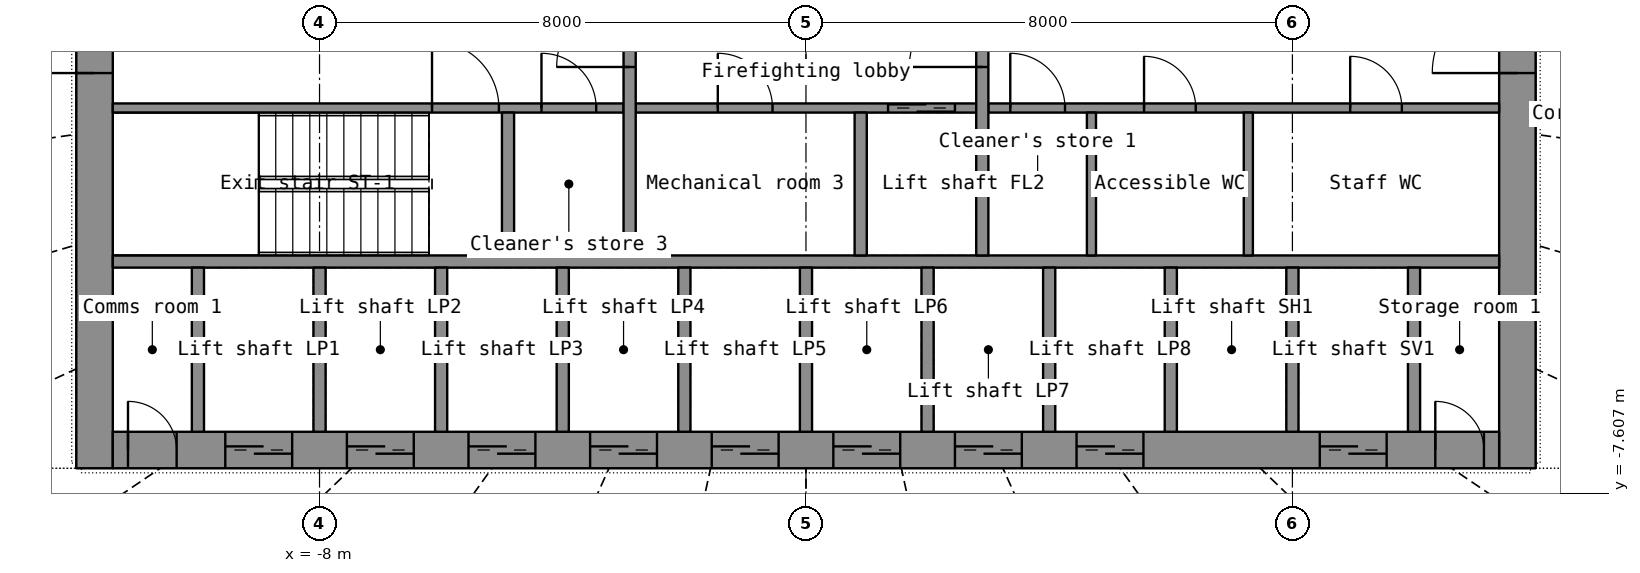
"""IFC4 building model, lengths in metres.
Left out: names, types, materials, properties, quantities, classifications, styles, units other than length and angle.
Written with IfcOpenShell. Run it as: python <this file> out.ifc"""

import sys

from ifc_helpers import new_model, si_unit, direction, frame, frame_2d, origin, place, context, subcontext, project, spatial, rectangle, extrude, element, fill, save


model = new_model("IFC4")
c1 = context("Model", 3, precision=1e-05, world=origin(), true_north=direction((0.0, 1.0)))
c2 = subcontext(c1, "Body", "Model", "MODEL_VIEW")
j1 = project(units=[si_unit("LENGTHUNIT", "METRE"), si_unit("PLANEANGLEUNIT", "RADIAN")], contexts=[c1])
p1 = place(None, origin())
s1 = spatial("IfcSite", under=j1, at=p1, CompositionType="ELEMENT")
p2 = place(p1, origin())
s2 = spatial("IfcBuilding", under=s1, at=p2, CompositionType="ELEMENT")
p3 = place(p2, frame((0.0, 0.0, 66.7)))
s3 = spatial("IfcBuildingStorey", under=s2, at=p3, CompositionType="ELEMENT", Elevation=66.7)
p4 = place(p3, frame((-11.7, -7.2, 0.0), z_axis=(0.0, 0.0, 1.0), x_axis=(0.0, 1.0, 0.0)))
e1 = element("IfcWall", 1, at=p4, inside=s3, PredefinedType="SHEAR", context=c2, shape_type="SweptSolid", body=[
    extrude(rectangle(XDim=14.4, YDim=0.6, at=frame_2d((7.2, 0.0))), origin(), (0.0, 0.0, 1.0), 3.3),
])
p5 = place(p4, frame((6.5, 0.0, 0.0)))
e2 = element("IfcOpeningElement", 2, at=p5, cuts=e1, PredefinedType="OPENING", context=c2, shape_type="SweptSolid", body=[
    extrude(rectangle(XDim=1.4, YDim=2.2, at=frame_2d((0.7, 1.1))), frame((0.0, 0.31, 0.0), z_axis=(0.0, -1.0, 0.0), x_axis=(1.0, 0.0, 0.0)), (0.0, 0.0, 1.0), 0.62),
])
p6 = place(p3, frame((11.7, -7.2, 0.0), z_axis=(0.0, 0.0, 1.0), x_axis=(0.0, 1.0, 0.0)))
e3 = element("IfcWall", 3, at=p6, inside=s3, PredefinedType="SHEAR", context=c2, shape_type="SweptSolid", body=[
    extrude(rectangle(XDim=14.4, YDim=0.6, at=frame_2d((7.2, 0.0))), origin(), (0.0, 0.0, 1.0), 3.3),
])
p7 = place(p6, frame((6.5, 0.0, 0.0)))
e4 = element("IfcOpeningElement", 4, at=p7, cuts=e3, PredefinedType="OPENING", context=c2, shape_type="SweptSolid", body=[
    extrude(rectangle(XDim=1.4, YDim=2.2, at=frame_2d((0.7, 1.1))), frame((0.0, 0.31, 0.0), z_axis=(0.0, -1.0, 0.0), x_axis=(1.0, 0.0, 0.0)), (0.0, 0.0, 1.0), 0.62),
])
p8 = place(p3, frame((-11.4, -6.9, 0.0), z_axis=(0.0, 0.0, 1.0), x_axis=(1.0, 0.0, 0.0)))
e5 = element("IfcWall", 5, at=p8, inside=s3, PredefinedType="SHEAR", context=c2, shape_type="SweptSolid", body=[
    extrude(rectangle(XDim=22.8, YDim=0.6, at=frame_2d((11.4, 0.0))), origin(), (0.0, 0.0, 1.0), 3.3),
])
p9 = place(p8, frame((1.85, 0.0, 0.0)))
e6 = element("IfcOpeningElement", 6, at=p9, cuts=e5, PredefinedType="OPENING", context=c2, shape_type="SweptSolid", body=[
    extrude(rectangle(XDim=1.1, YDim=2.2, at=frame_2d((0.55, 1.1))), frame((0.0, 0.31, 0.0), z_axis=(0.0, -1.0, 0.0), x_axis=(1.0, 0.0, 0.0)), (0.0, 0.0, 1.0), 0.62),
])
p10 = place(p8, frame((3.85, 0.0, 0.0)))
e7 = element("IfcOpeningElement", 7, at=p10, cuts=e5, PredefinedType="OPENING", context=c2, shape_type="SweptSolid", body=[
    extrude(rectangle(XDim=1.1, YDim=2.2, at=frame_2d((0.55, 1.1))), frame((0.0, 0.31, 0.0), z_axis=(0.0, -1.0, 0.0), x_axis=(1.0, 0.0, 0.0)), (0.0, 0.0, 1.0), 0.62),
])
p11 = place(p8, frame((5.85, 0.0, 0.0)))
e8 = element("IfcOpeningElement", 8, at=p11, cuts=e5, PredefinedType="OPENING", context=c2, shape_type="SweptSolid", body=[
    extrude(rectangle(XDim=1.1, YDim=2.2, at=frame_2d((0.55, 1.1))), frame((0.0, 0.31, 0.0), z_axis=(0.0, -1.0, 0.0), x_axis=(1.0, 0.0, 0.0)), (0.0, 0.0, 1.0), 0.62),
])
p12 = place(p8, frame((7.85, 0.0, 0.0)))
e9 = element("IfcOpeningElement", 9, at=p12, cuts=e5, PredefinedType="OPENING", context=c2, shape_type="SweptSolid", body=[
    extrude(rectangle(XDim=1.1, YDim=2.2, at=frame_2d((0.55, 1.1))), frame((0.0, 0.31, 0.0), z_axis=(0.0, -1.0, 0.0), x_axis=(1.0, 0.0, 0.0)), (0.0, 0.0, 1.0), 0.62),
])
p13 = place(p8, frame((9.85, 0.0, 0.0)))
e10 = element("IfcOpeningElement", 10, at=p13, cuts=e5, PredefinedType="OPENING", context=c2, shape_type="SweptSolid", body=[
    extrude(rectangle(XDim=1.1, YDim=2.2, at=frame_2d((0.55, 1.1))), frame((0.0, 0.31, 0.0), z_axis=(0.0, -1.0, 0.0), x_axis=(1.0, 0.0, 0.0)), (0.0, 0.0, 1.0), 0.62),
])
p14 = place(p8, frame((11.85, 0.0, 0.0)))
e11 = element("IfcOpeningElement", 11, at=p14, cuts=e5, PredefinedType="OPENING", context=c2, shape_type="SweptSolid", body=[
    extrude(rectangle(XDim=1.1, YDim=2.2, at=frame_2d((0.55, 1.1))), frame((0.0, 0.31, 0.0), z_axis=(0.0, -1.0, 0.0), x_axis=(1.0, 0.0, 0.0)), (0.0, 0.0, 1.0), 0.62),
])
p15 = place(p8, frame((13.85, 0.0, 0.0)))
e12 = element("IfcOpeningElement", 12, at=p15, cuts=e5, PredefinedType="OPENING", context=c2, shape_type="SweptSolid", body=[
    extrude(rectangle(XDim=1.1, YDim=2.2, at=frame_2d((0.55, 1.1))), frame((0.0, 0.31, 0.0), z_axis=(0.0, -1.0, 0.0), x_axis=(1.0, 0.0, 0.0)), (0.0, 0.0, 1.0), 0.62),
])
p16 = place(p8, frame((15.85, 0.0, 0.0)))
e13 = element("IfcOpeningElement", 13, at=p16, cuts=e5, PredefinedType="OPENING", context=c2, shape_type="SweptSolid", body=[
    extrude(rectangle(XDim=1.1, YDim=2.2, at=frame_2d((0.55, 1.1))), frame((0.0, 0.31, 0.0), z_axis=(0.0, -1.0, 0.0), x_axis=(1.0, 0.0, 0.0)), (0.0, 0.0, 1.0), 0.62),
])
p17 = place(p8, frame((19.85, 0.0, 0.0)))
e14 = element("IfcOpeningElement", 14, at=p17, cuts=e5, PredefinedType="OPENING", context=c2, shape_type="SweptSolid", body=[
    extrude(rectangle(XDim=1.1, YDim=2.2, at=frame_2d((0.55, 1.1))), frame((0.0, 0.31, 0.0), z_axis=(0.0, -1.0, 0.0), x_axis=(1.0, 0.0, 0.0)), (0.0, 0.0, 1.0), 0.62),
])
p18 = place(p8, frame((0.25, 0.0, 0.0)))
e15 = element("IfcOpeningElement", 15, at=p18, cuts=e5, PredefinedType="OPENING", context=c2, shape_type="SweptSolid", body=[
    extrude(rectangle(XDim=0.8, YDim=2.05, at=frame_2d((0.4, 1.025))), frame((0.0, 0.31, 0.0), z_axis=(0.0, -1.0, 0.0), x_axis=(1.0, 0.0, 0.0)), (0.0, 0.0, 1.0), 0.62),
])
p19 = place(p8, frame((21.75, 0.0, 0.0)))
e16 = element("IfcOpeningElement", 16, at=p19, cuts=e5, PredefinedType="OPENING", context=c2, shape_type="SweptSolid", body=[
    extrude(rectangle(XDim=0.8, YDim=2.05, at=frame_2d((0.4, 1.025))), frame((0.0, 0.31, 0.0), z_axis=(0.0, -1.0, 0.0), x_axis=(1.0, 0.0, 0.0)), (0.0, 0.0, 1.0), 0.62),
])
p20 = place(p3, frame((-11.4, -3.8, 0.0), z_axis=(0.0, 0.0, 1.0), x_axis=(1.0, 0.0, 0.0)))
e17 = element("IfcWall", 17, at=p20, inside=s3, PredefinedType="SHEAR", context=c2, shape_type="SweptSolid", body=[
    extrude(rectangle(XDim=22.8, YDim=0.2, at=frame_2d((11.4, 0.0))), origin(), (0.0, 0.0, 1.0), 3.3),
])
for number, where, z_axis, x_axis in (
    (18, (-10.0, -6.6, 0.0), (0.0, 0.0, 1.0), (0.0, 1.0, 0.0)),
    (19, (-8.0, -6.6, 0.0), (0.0, 0.0, 1.0), (0.0, 1.0, 0.0)),
    (20, (-6.0, -6.6, 0.0), (0.0, 0.0, 1.0), (0.0, 1.0, 0.0)),
    (21, (-4.0, -6.6, 0.0), (0.0, 0.0, 1.0), (0.0, 1.0, 0.0)),
    (22, (-2.0, -6.6, 0.0), (0.0, 0.0, 1.0), (0.0, 1.0, 0.0)),
    (23, (0.0, -6.6, 0.0), (0.0, 0.0, 1.0), (0.0, 1.0, 0.0)),
    (24, (2.0, -6.6, 0.0), (0.0, 0.0, 1.0), (0.0, 1.0, 0.0)),
    (25, (4.0, -6.6, 0.0), (0.0, 0.0, 1.0), (0.0, 1.0, 0.0)),
    (26, (6.0, -6.6, 0.0), (0.0, 0.0, 1.0), (0.0, 1.0, 0.0)),
    (27, (8.0, -6.6, 0.0), (0.0, 0.0, 1.0), (0.0, 1.0, 0.0)),
    (28, (10.0, -6.6, 0.0), (0.0, 0.0, 1.0), (0.0, 1.0, 0.0)),
):
    element("IfcWall", number, at=place(p3, frame(where, z_axis=z_axis, x_axis=x_axis)), inside=s3, PredefinedType="SHEAR", context=c2, shape_type="SweptSolid", body=[
        extrude(rectangle(XDim=2.7, YDim=0.2, at=frame_2d((1.35, 0.0))), origin(), (0.0, 0.0, 1.0), 3.3),
    ])
p21 = place(p3, frame((-11.4, -1.275, 0.0), z_axis=(0.0, 0.0, 1.0), x_axis=(1.0, 0.0, 0.0)))
e29 = element("IfcWall", 29, at=p21, inside=s3, PredefinedType="SHEAR", context=c2, shape_type="SweptSolid", body=[
    extrude(rectangle(XDim=8.4, YDim=0.15, at=frame_2d((4.2, 0.0))), origin(), (0.0, 0.0, 1.0), 3.3),
])
p22 = place(p21, frame((5.25, 0.0, 0.0)))
e30 = element("IfcOpeningElement", 30, at=p22, cuts=e29, PredefinedType="OPENING", context=c2, shape_type="SweptSolid", body=[
    extrude(rectangle(XDim=1.1, YDim=2.15, at=frame_2d((0.55, 1.075))), frame((0.0, 0.085, 0.0), z_axis=(0.0, -1.0, 0.0), x_axis=(1.0, 0.0, 0.0)), (0.0, 0.0, 1.0), 0.17),
])
p23 = place(p21, frame((7.05, 0.0, 0.0)))
e31 = element("IfcOpeningElement", 31, at=p23, cuts=e29, PredefinedType="OPENING", context=c2, shape_type="SweptSolid", body=[
    extrude(rectangle(XDim=0.9, YDim=2.1, at=frame_2d((0.45, 1.05))), frame((0.0, 0.085, 0.0), z_axis=(0.0, -1.0, 0.0), x_axis=(1.0, 0.0, 0.0)), (0.0, 0.0, 1.0), 0.17),
])
p24 = place(p3, frame((-2.8, -1.275, 0.0), z_axis=(0.0, 0.0, 1.0), x_axis=(1.0, 0.0, 0.0)))
e32 = element("IfcWall", 32, at=p24, inside=s3, PredefinedType="SHEAR", context=c2, shape_type="SweptSolid", body=[
    extrude(rectangle(XDim=5.6, YDim=0.15, at=frame_2d((2.8, 0.0))), origin(), (0.0, 0.0, 1.0), 3.3),
])
p25 = place(p24, frame((4.15, 0.0, 0.0)))
e33 = element("IfcOpeningElement", 33, at=p25, cuts=e32, PredefinedType="OPENING", context=c2, shape_type="SweptSolid", body=[
    extrude(rectangle(XDim=1.1, YDim=2.2, at=frame_2d((0.55, 1.1))), frame((0.0, 0.085, 0.0), z_axis=(0.0, -1.0, 0.0), x_axis=(1.0, 0.0, 0.0)), (0.0, 0.0, 1.0), 0.17),
])
p26 = place(p24, frame((1.35, 0.0, 0.0)))
e34 = element("IfcOpeningElement", 34, at=p26, cuts=e32, PredefinedType="OPENING", context=c2, shape_type="SweptSolid", body=[
    extrude(rectangle(XDim=0.9, YDim=2.1, at=frame_2d((0.45, 1.05))), frame((0.0, 0.085, 0.0), z_axis=(0.0, -1.0, 0.0), x_axis=(1.0, 0.0, 0.0)), (0.0, 0.0, 1.0), 0.17),
])
p27 = place(p3, frame((3.0, -1.275, 0.0), z_axis=(0.0, 0.0, 1.0), x_axis=(1.0, 0.0, 0.0)))
e35 = element("IfcWall", 35, at=p27, inside=s3, PredefinedType="PARTITIONING", context=c2, shape_type="SweptSolid", body=[
    extrude(rectangle(XDim=8.4, YDim=0.15, at=frame_2d((4.2, 0.0))), origin(), (0.0, 0.0, 1.0), 3.3),
])
p28 = place(p27, frame((0.36, 0.0, 0.0)))
e36 = element("IfcOpeningElement", 36, at=p28, cuts=e35, PredefinedType="OPENING", context=c2, shape_type="SweptSolid", body=[
    extrude(rectangle(XDim=0.9, YDim=2.1, at=frame_2d((0.45, 1.05))), frame((0.0, 0.085, 0.0), z_axis=(0.0, -1.0, 0.0), x_axis=(1.0, 0.0, 0.0)), (0.0, 0.0, 1.0), 0.17),
])
p29 = place(p27, frame((2.56, 0.0, 0.0)))
e37 = element("IfcOpeningElement", 37, at=p29, cuts=e35, PredefinedType="OPENING", context=c2, shape_type="SweptSolid", body=[
    extrude(rectangle(XDim=0.85, YDim=2.1, at=frame_2d((0.425, 1.05))), frame((0.0, 0.085, 0.0), z_axis=(0.0, -1.0, 0.0), x_axis=(1.0, 0.0, 0.0)), (0.0, 0.0, 1.0), 0.17),
])
p30 = place(p27, frame((5.95, 0.0, 0.0)))
e38 = element("IfcOpeningElement", 38, at=p30, cuts=e35, PredefinedType="OPENING", context=c2, shape_type="SweptSolid", body=[
    extrude(rectangle(XDim=0.85, YDim=2.1, at=frame_2d((0.425, 1.05))), frame((0.0, 0.085, 0.0), z_axis=(0.0, -1.0, 0.0), x_axis=(1.0, 0.0, 0.0)), (0.0, 0.0, 1.0), 0.17),
])
p31 = place(p3, frame((-2.9, -3.7, 0.0), z_axis=(0.0, 0.0, 1.0), x_axis=(0.0, 1.0, 0.0)))
e39 = element("IfcWall", 39, at=p31, inside=s3, PredefinedType="SHEAR", context=c2, shape_type="SweptSolid", body=[
    extrude(rectangle(XDim=7.4, YDim=0.2, at=frame_2d((3.7, 0.0))), origin(), (0.0, 0.0, 1.0), 3.3),
])
p32 = place(p31, frame((3.1, 0.0, 0.0)))
e40 = element("IfcOpeningElement", 40, at=p32, cuts=e39, PredefinedType="OPENING", context=c2, shape_type="SweptSolid", body=[
    extrude(rectangle(XDim=1.2, YDim=2.2, at=frame_2d((0.6, 1.1))), frame((0.0, 0.11, 0.0), z_axis=(0.0, -1.0, 0.0), x_axis=(1.0, 0.0, 0.0)), (0.0, 0.0, 1.0), 0.22),
])
p33 = place(p3, frame((2.9, -3.7, 0.0), z_axis=(0.0, 0.0, 1.0), x_axis=(0.0, 1.0, 0.0)))
e41 = element("IfcWall", 41, at=p33, inside=s3, PredefinedType="SHEAR", context=c2, shape_type="SweptSolid", body=[
    extrude(rectangle(XDim=7.4, YDim=0.2, at=frame_2d((3.7, 0.0))), origin(), (0.0, 0.0, 1.0), 3.3),
])
p34 = place(p33, frame((3.1, 0.0, 0.0)))
e42 = element("IfcOpeningElement", 42, at=p34, cuts=e41, PredefinedType="OPENING", context=c2, shape_type="SweptSolid", body=[
    extrude(rectangle(XDim=1.2, YDim=2.2, at=frame_2d((0.6, 1.1))), frame((0.0, 0.11, 0.0), z_axis=(0.0, -1.0, 0.0), x_axis=(1.0, 0.0, 0.0)), (0.0, 0.0, 1.0), 0.22),
])
for number, where, z_axis, x_axis in (
    (43, (0.9, -3.7, 0.0), (0.0, 0.0, 1.0), (0.0, 1.0, 0.0)),
    (44, (-4.9, -3.7, 0.0), (0.0, 0.0, 1.0), (0.0, 1.0, 0.0)),
):
    element("IfcWall", number, at=place(p3, frame(where, z_axis=z_axis, x_axis=x_axis)), inside=s3, PredefinedType="SHEAR", context=c2, shape_type="SweptSolid", body=[
        extrude(rectangle(XDim=2.35, YDim=0.2, at=frame_2d((1.175, 0.0))), origin(), (0.0, 0.0, 1.0), 3.3),
    ])
for number, where, z_axis, x_axis in (
    (45, (4.695, -3.7, 0.0), (0.0, 0.0, 1.0), (0.0, 1.0, 0.0)),
    (46, (7.275, -3.7, 0.0), (0.0, 0.0, 1.0), (0.0, 1.0, 0.0)),
):
    element("IfcWall", number, at=place(p3, frame(where, z_axis=z_axis, x_axis=x_axis)), inside=s3, PredefinedType="PARTITIONING", context=c2, shape_type="SweptSolid", body=[
        extrude(rectangle(XDim=2.35, YDim=0.15, at=frame_2d((1.175, 0.0))), origin(), (0.0, 0.0, 1.0), 3.3),
    ])
p35 = place(p9, origin())
e47 = element("IfcDoor", 47, at=p35, inside=s3, OperationType="DOUBLE_DOOR_SLIDING", PredefinedType="DOOR", context=c2, shape_type="SweptSolid", body=[
    extrude(rectangle(XDim=1.1, YDim=2.2, at=frame_2d((0.55, 1.1))), frame((0.0, 0.025, 0.0), z_axis=(0.0, -1.0, 0.0), x_axis=(1.0, 0.0, 0.0)), (0.0, 0.0, 1.0), 0.05),
])
fill(e6, e47)
p36 = place(p10, origin())
e48 = element("IfcDoor", 48, at=p36, inside=s3, OperationType="DOUBLE_DOOR_SLIDING", PredefinedType="DOOR", context=c2, shape_type="SweptSolid", body=[
    extrude(rectangle(XDim=1.1, YDim=2.2, at=frame_2d((0.55, 1.1))), frame((0.0, 0.025, 0.0), z_axis=(0.0, -1.0, 0.0), x_axis=(1.0, 0.0, 0.0)), (0.0, 0.0, 1.0), 0.05),
])
fill(e7, e48)
p37 = place(p11, origin())
e49 = element("IfcDoor", 49, at=p37, inside=s3, OperationType="DOUBLE_DOOR_SLIDING", PredefinedType="DOOR", context=c2, shape_type="SweptSolid", body=[
    extrude(rectangle(XDim=1.1, YDim=2.2, at=frame_2d((0.55, 1.1))), frame((0.0, 0.025, 0.0), z_axis=(0.0, -1.0, 0.0), x_axis=(1.0, 0.0, 0.0)), (0.0, 0.0, 1.0), 0.05),
])
fill(e8, e49)
p38 = place(p12, origin())
e50 = element("IfcDoor", 50, at=p38, inside=s3, OperationType="DOUBLE_DOOR_SLIDING", PredefinedType="DOOR", context=c2, shape_type="SweptSolid", body=[
    extrude(rectangle(XDim=1.1, YDim=2.2, at=frame_2d((0.55, 1.1))), frame((0.0, 0.025, 0.0), z_axis=(0.0, -1.0, 0.0), x_axis=(1.0, 0.0, 0.0)), (0.0, 0.0, 1.0), 0.05),
])
fill(e9, e50)
p39 = place(p13, origin())
e51 = element("IfcDoor", 51, at=p39, inside=s3, OperationType="DOUBLE_DOOR_SLIDING", PredefinedType="DOOR", context=c2, shape_type="SweptSolid", body=[
    extrude(rectangle(XDim=1.1, YDim=2.2, at=frame_2d((0.55, 1.1))), frame((0.0, 0.025, 0.0), z_axis=(0.0, -1.0, 0.0), x_axis=(1.0, 0.0, 0.0)), (0.0, 0.0, 1.0), 0.05),
])
fill(e10, e51)
p40 = place(p14, origin())
e52 = element("IfcDoor", 52, at=p40, inside=s3, OperationType="DOUBLE_DOOR_SLIDING", PredefinedType="DOOR", context=c2, shape_type="SweptSolid", body=[
    extrude(rectangle(XDim=1.1, YDim=2.2, at=frame_2d((0.55, 1.1))), frame((0.0, 0.025, 0.0), z_axis=(0.0, -1.0, 0.0), x_axis=(1.0, 0.0, 0.0)), (0.0, 0.0, 1.0), 0.05),
])
fill(e11, e52)
p41 = place(p15, origin())
e53 = element("IfcDoor", 53, at=p41, inside=s3, OperationType="DOUBLE_DOOR_SLIDING", PredefinedType="DOOR", context=c2, shape_type="SweptSolid", body=[
    extrude(rectangle(XDim=1.1, YDim=2.2, at=frame_2d((0.55, 1.1))), frame((0.0, 0.025, 0.0), z_axis=(0.0, -1.0, 0.0), x_axis=(1.0, 0.0, 0.0)), (0.0, 0.0, 1.0), 0.05),
])
fill(e12, e53)
p42 = place(p16, origin())
e54 = element("IfcDoor", 54, at=p42, inside=s3, OperationType="DOUBLE_DOOR_SLIDING", PredefinedType="DOOR", context=c2, shape_type="SweptSolid", body=[
    extrude(rectangle(XDim=1.1, YDim=2.2, at=frame_2d((0.55, 1.1))), frame((0.0, 0.025, 0.0), z_axis=(0.0, -1.0, 0.0), x_axis=(1.0, 0.0, 0.0)), (0.0, 0.0, 1.0), 0.05),
])
fill(e13, e54)
p43 = place(p17, origin())
e55 = element("IfcDoor", 55, at=p43, inside=s3, OperationType="DOUBLE_DOOR_SLIDING", PredefinedType="DOOR", context=c2, shape_type="SweptSolid", body=[
    extrude(rectangle(XDim=1.1, YDim=2.2, at=frame_2d((0.55, 1.1))), frame((0.0, 0.025, 0.0), z_axis=(0.0, -1.0, 0.0), x_axis=(1.0, 0.0, 0.0)), (0.0, 0.0, 1.0), 0.05),
])
fill(e14, e55)
p44 = place(p18, origin())
e56 = element("IfcDoor", 56, at=p44, inside=s3, OperationType="SINGLE_SWING_LEFT", PredefinedType="DOOR", context=c2, shape_type="SweptSolid", body=[
    extrude(rectangle(XDim=0.8, YDim=2.05, at=frame_2d((0.4, 1.025))), frame((0.0, 0.025, 0.0), z_axis=(0.0, -1.0, 0.0), x_axis=(1.0, 0.0, 0.0)), (0.0, 0.0, 1.0), 0.05),
])
fill(e15, e56)
p45 = place(p19, origin())
e57 = element("IfcDoor", 57, at=p45, inside=s3, OperationType="SINGLE_SWING_LEFT", PredefinedType="DOOR", context=c2, shape_type="SweptSolid", body=[
    extrude(rectangle(XDim=0.8, YDim=2.05, at=frame_2d((0.4, 1.025))), frame((0.0, 0.025, 0.0), z_axis=(0.0, -1.0, 0.0), x_axis=(1.0, 0.0, 0.0)), (0.0, 0.0, 1.0), 0.05),
])
fill(e16, e57)
p46 = place(p5, origin())
e58 = element("IfcDoor", 58, at=p46, inside=s3, OperationType="DOUBLE_DOOR_SINGLE_SWING", PredefinedType="DOOR", context=c2, shape_type="SweptSolid", body=[
    extrude(rectangle(XDim=1.4, YDim=2.2, at=frame_2d((0.7, 1.1))), frame((0.0, 0.025, 0.0), z_axis=(0.0, -1.0, 0.0), x_axis=(1.0, 0.0, 0.0)), (0.0, 0.0, 1.0), 0.05),
])
fill(e2, e58)
p47 = place(p7, origin())
e59 = element("IfcDoor", 59, at=p47, inside=s3, OperationType="DOUBLE_DOOR_SINGLE_SWING", PredefinedType="DOOR", context=c2, shape_type="SweptSolid", body=[
    extrude(rectangle(XDim=1.4, YDim=2.2, at=frame_2d((0.7, 1.1))), frame((0.0, 0.025, 0.0), z_axis=(0.0, -1.0, 0.0), x_axis=(1.0, 0.0, 0.0)), (0.0, 0.0, 1.0), 0.05),
])
fill(e4, e59)
p48 = place(p32, origin())
e60 = element("IfcDoor", 60, at=p48, inside=s3, OperationType="SINGLE_SWING_LEFT", PredefinedType="DOOR", context=c2, shape_type="SweptSolid", body=[
    extrude(rectangle(XDim=1.2, YDim=2.2, at=frame_2d((0.6, 1.1))), frame((0.0, 0.025, 0.0), z_axis=(0.0, -1.0, 0.0), x_axis=(1.0, 0.0, 0.0)), (0.0, 0.0, 1.0), 0.05),
])
fill(e40, e60)
p49 = place(p34, origin())
e61 = element("IfcDoor", 61, at=p49, inside=s3, OperationType="SINGLE_SWING_LEFT", PredefinedType="DOOR", context=c2, shape_type="SweptSolid", body=[
    extrude(rectangle(XDim=1.2, YDim=2.2, at=frame_2d((0.6, 1.1))), frame((0.0, 0.025, 0.0), z_axis=(0.0, -1.0, 0.0), x_axis=(1.0, 0.0, 0.0)), (0.0, 0.0, 1.0), 0.05),
])
fill(e42, e61)
p50 = place(p25, origin())
e62 = element("IfcDoor", 62, at=p50, inside=s3, OperationType="DOUBLE_DOOR_SLIDING", PredefinedType="DOOR", context=c2, shape_type="SweptSolid", body=[
    extrude(rectangle(XDim=1.1, YDim=2.2, at=frame_2d((0.55, 1.1))), frame((0.0, 0.025, 0.0), z_axis=(0.0, -1.0, 0.0), x_axis=(1.0, 0.0, 0.0)), (0.0, 0.0, 1.0), 0.05),
])
fill(e33, e62)
p51 = place(p22, origin())
e63 = element("IfcDoor", 63, at=p51, inside=s3, OperationType="SINGLE_SWING_LEFT", PredefinedType="DOOR", context=c2, shape_type="SweptSolid", body=[
    extrude(rectangle(XDim=1.1, YDim=2.15, at=frame_2d((0.55, 1.075))), frame((0.0, 0.025, 0.0), z_axis=(0.0, -1.0, 0.0), x_axis=(1.0, 0.0, 0.0)), (0.0, 0.0, 1.0), 0.05),
])
fill(e30, e63)
p52 = place(p28, origin())
e64 = element("IfcDoor", 64, at=p52, inside=s3, OperationType="SINGLE_SWING_LEFT", PredefinedType="DOOR", context=c2, shape_type="SweptSolid", body=[
    extrude(rectangle(XDim=0.9, YDim=2.1, at=frame_2d((0.45, 1.05))), frame((0.0, 0.025, 0.0), z_axis=(0.0, -1.0, 0.0), x_axis=(1.0, 0.0, 0.0)), (0.0, 0.0, 1.0), 0.05),
])
fill(e36, e64)
p53 = place(p29, origin())
e65 = element("IfcDoor", 65, at=p53, inside=s3, OperationType="SINGLE_SWING_LEFT", PredefinedType="DOOR", context=c2, shape_type="SweptSolid", body=[
    extrude(rectangle(XDim=0.85, YDim=2.1, at=frame_2d((0.425, 1.05))), frame((0.0, 0.025, 0.0), z_axis=(0.0, -1.0, 0.0), x_axis=(1.0, 0.0, 0.0)), (0.0, 0.0, 1.0), 0.05),
])
fill(e37, e65)
p54 = place(p30, origin())
e66 = element("IfcDoor", 66, at=p54, inside=s3, OperationType="SINGLE_SWING_LEFT", PredefinedType="DOOR", context=c2, shape_type="SweptSolid", body=[
    extrude(rectangle(XDim=0.85, YDim=2.1, at=frame_2d((0.425, 1.05))), frame((0.0, 0.025, 0.0), z_axis=(0.0, -1.0, 0.0), x_axis=(1.0, 0.0, 0.0)), (0.0, 0.0, 1.0), 0.05),
])
fill(e38, e66)
p55 = place(p26, origin())
e67 = element("IfcDoor", 67, at=p55, inside=s3, OperationType="SINGLE_SWING_LEFT", PredefinedType="DOOR", context=c2, shape_type="SweptSolid", body=[
    extrude(rectangle(XDim=0.9, YDim=2.1, at=frame_2d((0.45, 1.05))), frame((0.0, 0.025, 0.0), z_axis=(0.0, -1.0, 0.0), x_axis=(1.0, 0.0, 0.0)), (0.0, 0.0, 1.0), 0.05),
])
fill(e34, e67)
p56 = place(p23, origin())
e68 = element("IfcDoor", 68, at=p56, inside=s3, OperationType="SINGLE_SWING_LEFT", PredefinedType="DOOR", context=c2, shape_type="SweptSolid", body=[
    extrude(rectangle(XDim=0.9, YDim=2.1, at=frame_2d((0.45, 1.05))), frame((0.0, 0.025, 0.0), z_axis=(0.0, -1.0, 0.0), x_axis=(1.0, 0.0, 0.0)), (0.0, 0.0, 1.0), 0.05),
])
fill(e31, e68)
save(model, sys.argv[1])
